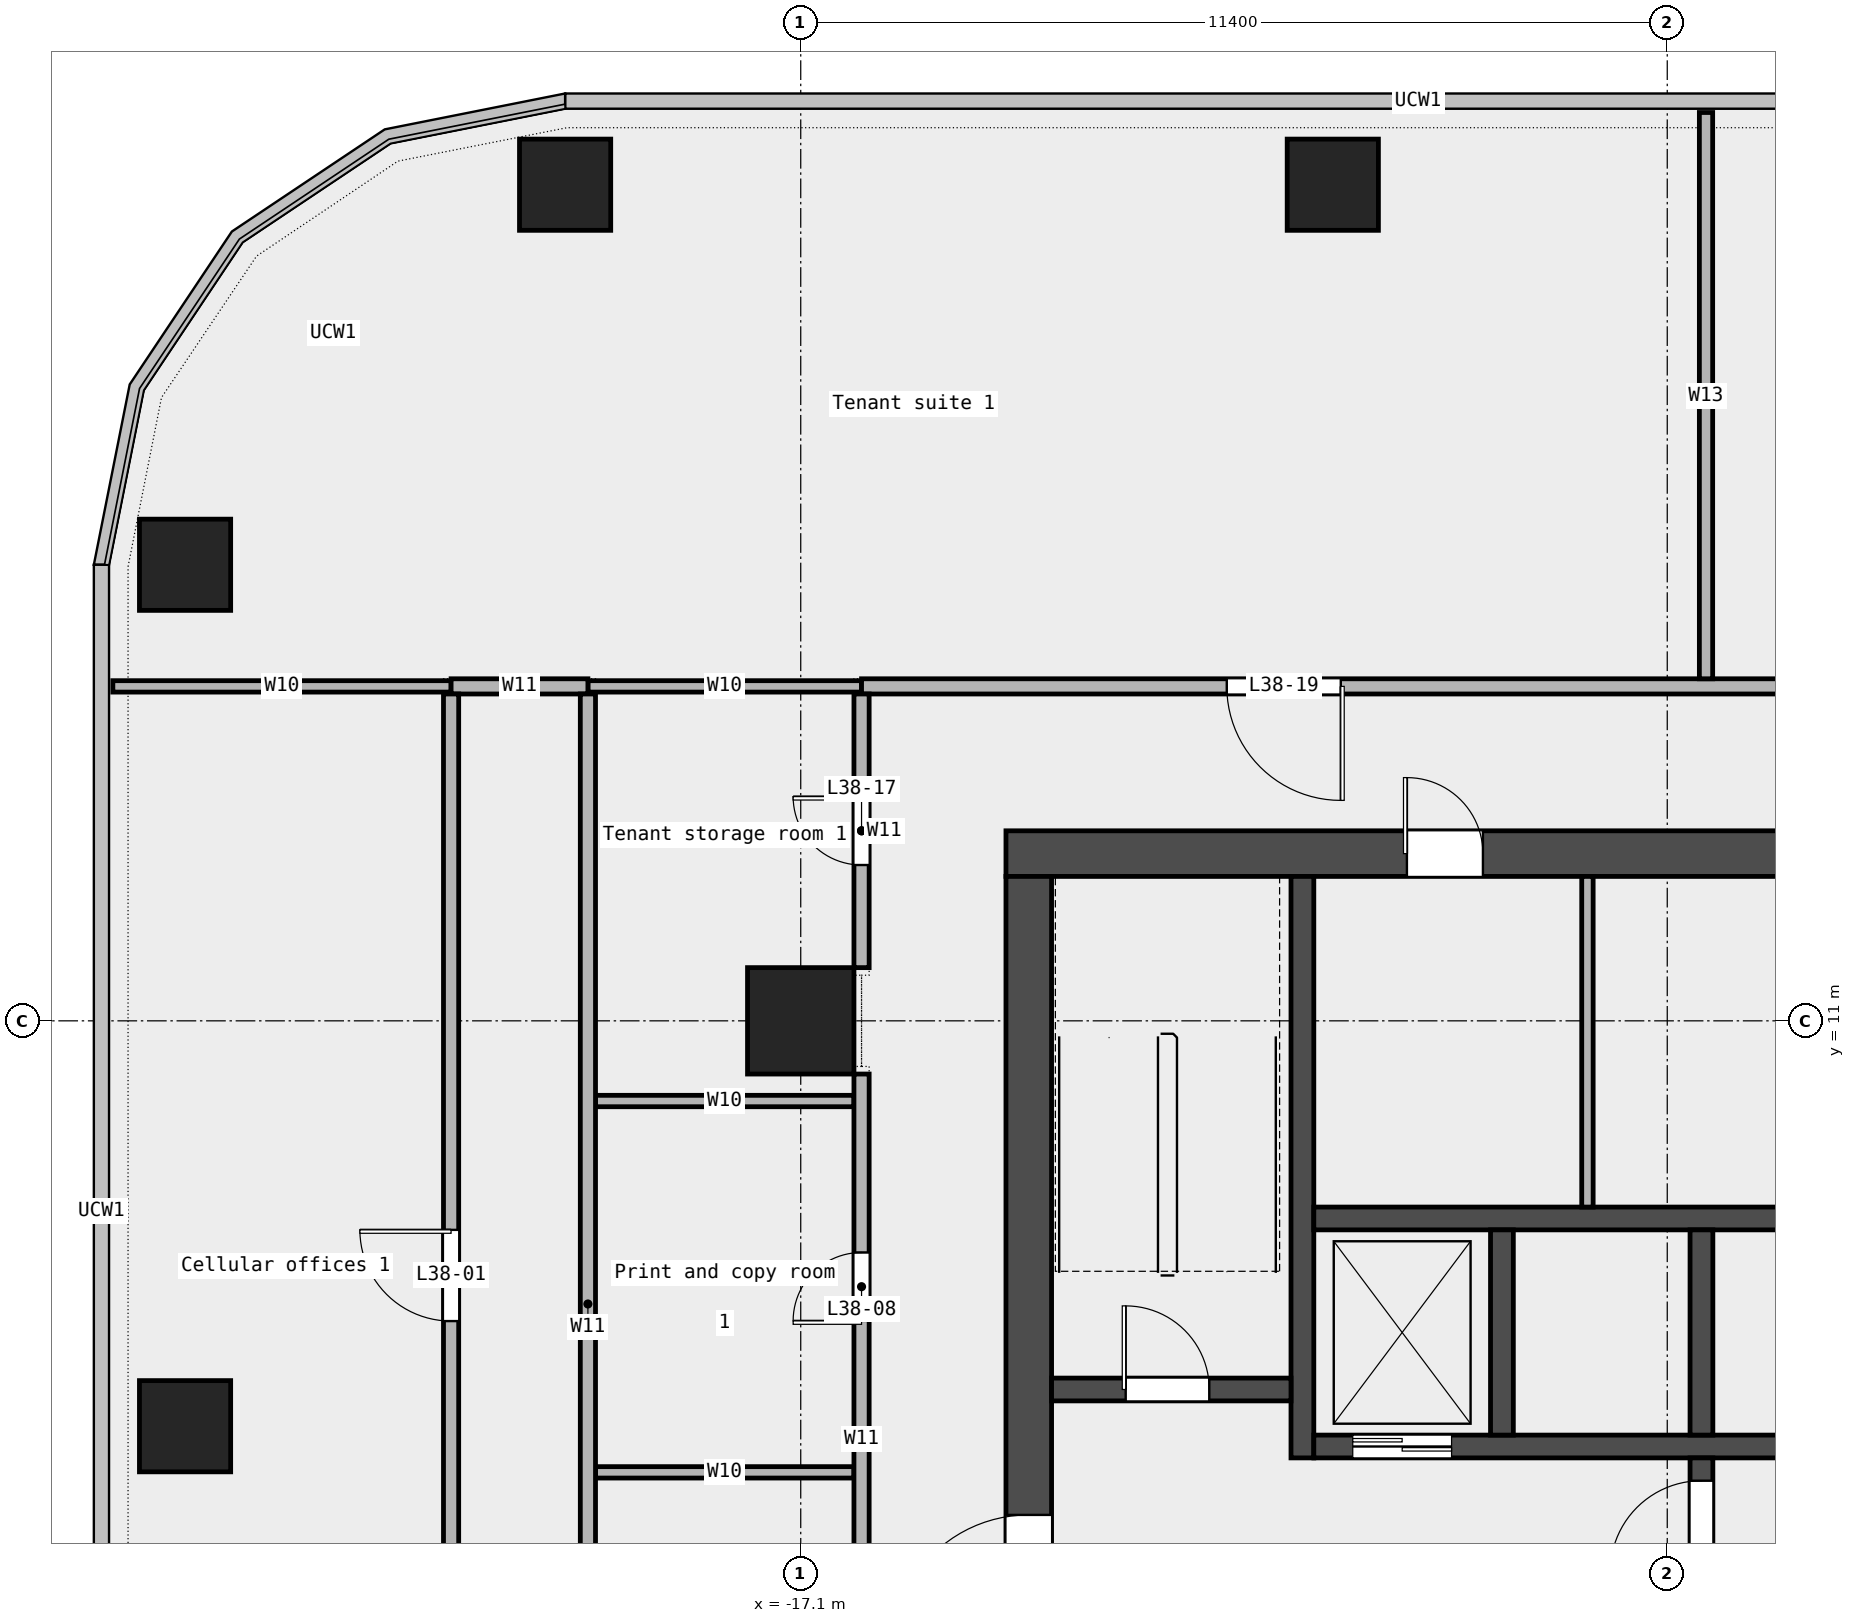
"""IFC4 building model, lengths in metres.
Left out: names, types, materials, properties, quantities, classifications, styles, units other than length and angle.
Written with IfcOpenShell. Run it as: python <this file> out.ifc"""

import sys

from ifc_helpers import new_model, si_unit, direction, frame, frame_2d, origin, origin_2d, place, context, subcontext, project, spatial, rectangle, extrude, element, fill, save


model = new_model("IFC4")
c1 = context("Model", 3, precision=1e-05, world=origin(), true_north=direction((0.0, 1.0)))
c2 = subcontext(c1, "Body", "Model", "MODEL_VIEW")
j1 = project(units=[si_unit("LENGTHUNIT", "METRE"), si_unit("PLANEANGLEUNIT", "RADIAN")], contexts=[c1])
p1 = place(None, origin())
s1 = spatial("IfcSite", under=j1, at=p1, CompositionType="ELEMENT")
p2 = place(p1, origin())
s2 = spatial("IfcBuilding", under=s1, at=p2, CompositionType="ELEMENT")
p3 = place(p2, frame((0.0, 0.0, 185.0)))
s3 = spatial("IfcBuildingStorey", under=s2, at=p3, CompositionType="ELEMENT", Elevation=185.0)
for number, where, z_axis, x_axis in (
    (1, (-10.1, 22.0, 0.0), (0.0, 0.0, 1.0), (1.0, 0.0, 0.0)),
    (2, (-20.2, 22.0, 0.0), (0.0, 0.0, 1.0), (1.0, 0.0, 0.0)),
    (3, (-25.2, 17.0, 0.0), (0.0, 0.0, 1.0), (1.0, 0.0, 0.0)),
    (4, (-25.2, 5.667, 0.0), (0.0, 0.0, 1.0), (1.0, 0.0, 0.0)),
):
    element("IfcColumn", number, at=place(p3, frame(where, z_axis=z_axis, x_axis=x_axis)), inside=s3, PredefinedType="COLUMN", context=c2, shape_type="SweptSolid", body=[
        extrude(rectangle(XDim=1.2, YDim=1.2, at=origin_2d()), origin(), (0.0, 0.0, 1.0), 3.6),
    ])
p4 = place(p3, frame((-17.1, 11.0, 0.0), z_axis=(0.0, 0.0, 1.0), x_axis=(1.0, 0.0, 0.0)))
e5 = element("IfcColumn", 5, at=p4, inside=s3, PredefinedType="COLUMN", context=c2, shape_type="SweptSolid", body=[
    extrude(rectangle(XDim=1.4, YDim=1.4, at=origin_2d()), origin(), (0.0, 0.0, 1.0), 3.6),
])
for number, where, z_axis, x_axis in (
    (6, (-19.8, 5.06, 0.0), (0.0, 0.0, 1.0), (1.0, 0.0, 0.0)),
    (7, (-19.8, 9.945, 0.0), (0.0, 0.0, 1.0), (1.0, 0.0, 0.0)),
):
    element("IfcWall", number, at=place(p3, frame(where, z_axis=z_axis, x_axis=x_axis)), inside=s3, PredefinedType="PARTITIONING", context=c2, shape_type="SweptSolid", body=[
        extrude(rectangle(XDim=3.4, YDim=0.15, at=frame_2d((1.7, 0.0))), origin(), (0.0, 0.0, 1.0), 3.6),
    ])
p5 = place(p3, frame((-26.15, 15.4, 0.0), z_axis=(0.0, 0.0, 1.0), x_axis=(1.0, 0.0, 0.0)))
e8 = element("IfcWall", 8, at=p5, inside=s3, PredefinedType="PARTITIONING", context=c2, shape_type="SweptSolid", body=[
    extrude(rectangle(XDim=4.45, YDim=0.15, at=frame_2d((2.225, 0.0))), origin(), (0.0, 0.0, 1.0), 3.6),
])
p6 = place(p3, frame((-19.9, 15.4, 0.0), z_axis=(0.0, 0.0, 1.0), x_axis=(1.0, 0.0, 0.0)))
e9 = element("IfcWall", 9, at=p6, inside=s3, PredefinedType="PARTITIONING", context=c2, shape_type="SweptSolid", body=[
    extrude(rectangle(XDim=3.6, YDim=0.15, at=frame_2d((1.8, 0.0))), origin(), (0.0, 0.0, 1.0), 3.6),
])
p7 = place(p3, frame((-21.7, 15.4, 0.0), z_axis=(0.0, 0.0, 1.0), x_axis=(1.0, 0.0, 0.0)))
e10 = element("IfcWall", 10, at=p7, inside=s3, PredefinedType="PARTITIONING", context=c2, shape_type="SweptSolid", body=[
    extrude(rectangle(XDim=1.8, YDim=0.2, at=frame_2d((0.9, 0.0))), origin(), (0.0, 0.0, 1.0), 3.6),
])
p8 = place(p3, frame((-16.3, 15.4, 0.0), z_axis=(0.0, 0.0, 1.0), x_axis=(1.0, 0.0, 0.0)))
e11 = element("IfcWall", 11, at=p8, inside=s3, PredefinedType="PARTITIONING", context=c2, shape_type="SweptSolid", body=[
    extrude(rectangle(XDim=32.6, YDim=0.2, at=frame_2d((16.3, 0.0))), origin(), (0.0, 0.0, 1.0), 3.6),
])
p9 = place(p8, frame((24.677, 0.0, 0.0)))
e12 = element("IfcOpeningElement", 12, at=p9, cuts=e11, PredefinedType="OPENING", context=c2, shape_type="SweptSolid", body=[
    extrude(rectangle(XDim=1.2, YDim=2.1, at=frame_2d((0.6, 1.05))), frame((0.0, 0.112, 0.0), z_axis=(0.0, -1.0, 0.0), x_axis=(1.0, 0.0, 0.0)), (0.0, 0.0, 1.0), 0.224),
])
p10 = place(p8, frame((4.805, 0.0, 0.0)))
e13 = element("IfcOpeningElement", 13, at=p10, cuts=e11, PredefinedType="OPENING", context=c2, shape_type="SweptSolid", body=[
    extrude(rectangle(XDim=1.5, YDim=2.1, at=frame_2d((0.75, 1.05))), frame((0.0, 0.112, 0.0), z_axis=(0.0, -1.0, 0.0), x_axis=(1.0, 0.0, 0.0)), (0.0, 0.0, 1.0), 0.224),
])
p11 = place(p8, frame((14.228, 0.0, 0.0)))
e14 = element("IfcOpeningElement", 14, at=p11, cuts=e11, PredefinedType="OPENING", context=c2, shape_type="SweptSolid", body=[
    extrude(rectangle(XDim=1.2, YDim=2.1, at=frame_2d((0.6, 1.05))), frame((0.0, 0.112, 0.0), z_axis=(0.0, -1.0, 0.0), x_axis=(1.0, 0.0, 0.0)), (0.0, 0.0, 1.0), 0.224),
])
p12 = place(p3, frame((-21.7, -9.0, 0.0), z_axis=(0.0, 0.0, 1.0), x_axis=(0.0, 1.0, 0.0)))
e15 = element("IfcWall", 15, at=p12, inside=s3, PredefinedType="PARTITIONING", context=c2, shape_type="SweptSolid", body=[
    extrude(rectangle(XDim=24.3, YDim=0.2, at=frame_2d((12.15, 0.0))), origin(), (0.0, 0.0, 1.0), 3.6),
])
p13 = place(p12, frame((16.05, 0.0, 0.0)))
e16 = element("IfcOpeningElement", 16, at=p13, cuts=e15, PredefinedType="OPENING", context=c2, shape_type="SweptSolid", body=[
    extrude(rectangle(XDim=1.2, YDim=2.1, at=frame_2d((0.6, 1.05))), frame((0.0, 0.112, 0.0), z_axis=(0.0, -1.0, 0.0), x_axis=(1.0, 0.0, 0.0)), (0.0, 0.0, 1.0), 0.224),
])
p14 = place(p3, frame((-19.9, -0.75, 0.0), z_axis=(0.0, 0.0, 1.0), x_axis=(0.0, 1.0, 0.0)))
e17 = element("IfcWall", 17, at=p14, inside=s3, PredefinedType="PARTITIONING", context=c2, shape_type="SweptSolid", body=[
    extrude(rectangle(XDim=16.05, YDim=0.2, at=frame_2d((8.025, 0.0))), origin(), (0.0, 0.0, 1.0), 3.6),
])
p15 = place(p3, frame((-16.3, 0.7, 0.0), z_axis=(0.0, 0.0, 1.0), x_axis=(0.0, 1.0, 0.0)))
e18 = element("IfcWall", 18, at=p15, inside=s3, PredefinedType="PARTITIONING", context=c2, shape_type="SweptSolid", body=[
    extrude(rectangle(XDim=9.6, YDim=0.2, at=frame_2d((4.8, 0.0))), origin(), (0.0, 0.0, 1.0), 3.6),
])
p16 = place(p15, frame((1.73, 0.0, 0.0)))
e19 = element("IfcOpeningElement", 19, at=p16, cuts=e18, PredefinedType="OPENING", context=c2, shape_type="SweptSolid", body=[
    extrude(rectangle(XDim=0.9, YDim=2.1, at=frame_2d((0.45, 1.05))), frame((0.0, 0.112, 0.0), z_axis=(0.0, -1.0, 0.0), x_axis=(1.0, 0.0, 0.0)), (0.0, 0.0, 1.0), 0.224),
])
p17 = place(p15, frame((6.353, 0.0, 0.0)))
e20 = element("IfcOpeningElement", 20, at=p17, cuts=e18, PredefinedType="OPENING", context=c2, shape_type="SweptSolid", body=[
    extrude(rectangle(XDim=0.9, YDim=2.1, at=frame_2d((0.45, 1.05))), frame((0.0, 0.112, 0.0), z_axis=(0.0, -1.0, 0.0), x_axis=(1.0, 0.0, 0.0)), (0.0, 0.0, 1.0), 0.224),
])
p18 = place(p3, frame((-16.3, 11.7, 0.0), z_axis=(0.0, 0.0, 1.0), x_axis=(0.0, 1.0, 0.0)))
e21 = element("IfcWall", 21, at=p18, inside=s3, PredefinedType="PARTITIONING", context=c2, shape_type="SweptSolid", body=[
    extrude(rectangle(XDim=3.6, YDim=0.2, at=frame_2d((1.8, 0.0))), origin(), (0.0, 0.0, 1.0), 3.6),
])
p19 = place(p18, frame((1.35, 0.0, 0.0)))
e22 = element("IfcOpeningElement", 22, at=p19, cuts=e21, PredefinedType="OPENING", context=c2, shape_type="SweptSolid", body=[
    extrude(rectangle(XDim=0.9, YDim=2.1, at=frame_2d((0.45, 1.05))), frame((0.0, 0.112, 0.0), z_axis=(0.0, -1.0, 0.0), x_axis=(1.0, 0.0, 0.0)), (0.0, 0.0, 1.0), 0.224),
])
p20 = place(p3, frame((-5.19, 15.5, 0.0), z_axis=(0.0, 0.0, 1.0), x_axis=(0.0, 1.0, 0.0)))
e23 = element("IfcWall", 23, at=p20, inside=s3, PredefinedType="PARTITIONING", context=c2, shape_type="SweptSolid", body=[
    extrude(rectangle(XDim=7.45, YDim=0.175, at=frame_2d((3.725, 0.0))), origin(), (0.0, 0.0, 1.0), 3.6),
])
p21 = place(p3, frame((-14.4, 13.2, 0.0), z_axis=(0.0, 0.0, 1.0), x_axis=(1.0, 0.0, 0.0)))
e24 = element("IfcWall", 24, at=p21, inside=s3, PredefinedType="SHEAR", context=c2, shape_type="SweptSolid", body=[
    extrude(rectangle(XDim=28.8, YDim=0.6, at=frame_2d((14.4, 0.0))), origin(), (0.0, 0.0, 1.0), 3.7),
])
p22 = place(p21, frame((5.275, 0.0, 0.0)))
e25 = element("IfcOpeningElement", 25, at=p22, cuts=e24, PredefinedType="OPENING", context=c2, shape_type="SweptSolid", body=[
    extrude(rectangle(XDim=1.0, YDim=2.1, at=frame_2d((0.5, 1.05))), frame((0.0, 0.312, 0.0), z_axis=(0.0, -1.0, 0.0), x_axis=(1.0, 0.0, 0.0)), (0.0, 0.0, 1.0), 0.624),
])
p23 = place(p21, frame((10.525, 0.0, 0.0)))
e26 = element("IfcOpeningElement", 26, at=p23, cuts=e24, PredefinedType="OPENING", context=c2, shape_type="SweptSolid", body=[
    extrude(rectangle(XDim=1.0, YDim=2.1, at=frame_2d((0.5, 1.05))), frame((0.0, 0.312, 0.0), z_axis=(0.0, -1.0, 0.0), x_axis=(1.0, 0.0, 0.0)), (0.0, 0.0, 1.0), 0.624),
])
p24 = place(p21, frame((15.587, 0.0, 0.0)))
e27 = element("IfcOpeningElement", 27, at=p24, cuts=e24, PredefinedType="OPENING", context=c2, shape_type="SweptSolid", body=[
    extrude(rectangle(XDim=1.0, YDim=2.1, at=frame_2d((0.5, 1.05))), frame((0.0, 0.312, 0.0), z_axis=(0.0, -1.0, 0.0), x_axis=(1.0, 0.0, 0.0)), (0.0, 0.0, 1.0), 0.624),
])
p25 = place(p21, frame((19.15, 0.0, 0.0)))
e28 = element("IfcOpeningElement", 28, at=p25, cuts=e24, PredefinedType="OPENING", context=c2, shape_type="SweptSolid", body=[
    extrude(rectangle(XDim=1.0, YDim=2.1, at=frame_2d((0.5, 1.05))), frame((0.0, 0.312, 0.0), z_axis=(0.0, -1.0, 0.0), x_axis=(1.0, 0.0, 0.0)), (0.0, 0.0, 1.0), 0.624),
])
p26 = place(p21, frame((22.712, 0.0, 0.0)))
e29 = element("IfcOpeningElement", 29, at=p26, cuts=e24, PredefinedType="OPENING", context=c2, shape_type="SweptSolid", body=[
    extrude(rectangle(XDim=1.0, YDim=2.1, at=frame_2d((0.5, 1.05))), frame((0.0, 0.312, 0.0), z_axis=(0.0, -1.0, 0.0), x_axis=(1.0, 0.0, 0.0)), (0.0, 0.0, 1.0), 0.624),
])
p27 = place(p3, frame((-14.1, -6.6, 0.0), z_axis=(0.0, 0.0, 1.0), x_axis=(0.0, 1.0, 0.0)))
e30 = element("IfcWall", 30, at=p27, inside=s3, PredefinedType="SHEAR", context=c2, shape_type="SweptSolid", body=[
    extrude(rectangle(XDim=19.5, YDim=0.6, at=frame_2d((9.75, 0.0))), origin(), (0.0, 0.0, 1.0), 3.7),
])
p28 = place(p27, frame((9.3, 0.0, 0.0)))
e31 = element("IfcOpeningElement", 31, at=p28, cuts=e30, PredefinedType="OPENING", context=c2, shape_type="SweptSolid", body=[
    extrude(rectangle(XDim=1.8, YDim=2.1, at=frame_2d((0.9, 1.05))), frame((0.0, 0.312, 0.0), z_axis=(0.0, -1.0, 0.0), x_axis=(1.0, 0.0, 0.0)), (0.0, 0.0, 1.0), 0.624),
])
p29 = place(p3, frame((-10.5, 5.25, 0.0), z_axis=(0.0, 0.0, 1.0), x_axis=(0.0, 1.0, 0.0)))
e32 = element("IfcWall", 32, at=p29, inside=s3, PredefinedType="SHEAR", context=c2, shape_type="SweptSolid", body=[
    extrude(rectangle(XDim=7.65, YDim=0.3, at=frame_2d((3.825, 0.0))), origin(), (0.0, 0.0, 1.0), 3.7),
])
p30 = place(p3, frame((-13.8, 6.15, 0.0), z_axis=(0.0, 0.0, 1.0), x_axis=(1.0, 0.0, 0.0)))
e33 = element("IfcWall", 33, at=p30, inside=s3, PredefinedType="SOLIDWALL", context=c2, shape_type="SweptSolid", body=[
    extrude(rectangle(XDim=3.15, YDim=0.3, at=frame_2d((1.575, 0.0))), origin(), (0.0, 0.0, 1.0), 3.7),
])
p31 = place(p30, frame((0.975, 0.0, 0.0)))
e34 = element("IfcOpeningElement", 34, at=p31, cuts=e33, PredefinedType="OPENING", context=c2, shape_type="SweptSolid", body=[
    extrude(rectangle(XDim=1.1, YDim=2.1, at=frame_2d((0.55, 1.05))), frame((0.0, 0.162, 0.0), z_axis=(0.0, -1.0, 0.0), x_axis=(1.0, 0.0, 0.0)), (0.0, 0.0, 1.0), 0.324),
])
p32 = place(p3, frame((-10.35, 5.4, 0.0), z_axis=(0.0, 0.0, 1.0), x_axis=(1.0, 0.0, 0.0)))
e35 = element("IfcWall", 35, at=p32, inside=s3, PredefinedType="SOLIDWALL", context=c2, shape_type="SweptSolid", body=[
    extrude(rectangle(XDim=20.7, YDim=0.3, at=frame_2d((10.35, 0.0))), origin(), (0.0, 0.0, 1.0), 3.7),
])
p33 = place(p32, frame((0.512, 0.0, 0.0)))
e36 = element("IfcOpeningElement", 36, at=p33, cuts=e35, PredefinedType="OPENING", context=c2, shape_type="SweptSolid", body=[
    extrude(rectangle(XDim=1.3, YDim=2.1, at=frame_2d((0.65, 1.05))), frame((0.0, 0.162, 0.0), z_axis=(0.0, -1.0, 0.0), x_axis=(1.0, 0.0, 0.0)), (0.0, 0.0, 1.0), 0.324),
])
p34 = place(p3, frame((-10.35, 8.4, 0.0), z_axis=(0.0, 0.0, 1.0), x_axis=(1.0, 0.0, 0.0)))
e37 = element("IfcWall", 37, at=p34, inside=s3, PredefinedType="SOLIDWALL", context=c2, shape_type="SweptSolid", body=[
    extrude(rectangle(XDim=20.7, YDim=0.3, at=frame_2d((10.35, 0.0))), origin(), (0.0, 0.0, 1.0), 3.7),
])
for number, where, z_axis, x_axis in (
    (38, (-7.875, 5.55, 0.0), (0.0, 0.0, 1.0), (0.0, 1.0, 0.0)),
    (39, (-5.25, 5.55, 0.0), (0.0, 0.0, 1.0), (0.0, 1.0, 0.0)),
):
    element("IfcWall", number, at=place(p3, frame(where, z_axis=z_axis, x_axis=x_axis)), inside=s3, PredefinedType="SOLIDWALL", context=c2, shape_type="SweptSolid", body=[
        extrude(rectangle(XDim=2.7, YDim=0.3, at=frame_2d((1.35, 0.0))), origin(), (0.0, 0.0, 1.0), 3.7),
    ])
p35 = place(p3, frame((-5.25, 1.95, 0.0), z_axis=(0.0, 0.0, 1.0), x_axis=(0.0, 1.0, 0.0)))
e40 = element("IfcWall", 40, at=p35, inside=s3, PredefinedType="SOLIDWALL", context=c2, shape_type="SweptSolid", body=[
    extrude(rectangle(XDim=3.3, YDim=0.3, at=frame_2d((1.65, 0.0))), origin(), (0.0, 0.0, 1.0), 3.7),
])
p36 = place(p35, frame((0.3, 0.0, 0.0)))
e41 = element("IfcOpeningElement", 41, at=p36, cuts=e40, PredefinedType="OPENING", context=c2, shape_type="SweptSolid", body=[
    extrude(rectangle(XDim=1.2, YDim=2.1, at=frame_2d((0.6, 1.05))), frame((0.0, 0.162, 0.0), z_axis=(0.0, -1.0, 0.0), x_axis=(1.0, 0.0, 0.0)), (0.0, 0.0, 1.0), 0.324),
])
p37 = place(p35, frame((1.8, 0.0, 0.0)))
e42 = element("IfcOpeningElement", 42, at=p37, cuts=e40, PredefinedType="OPENING", context=c2, shape_type="SweptSolid", body=[
    extrude(rectangle(XDim=1.2, YDim=2.1, at=frame_2d((0.6, 1.05))), frame((0.0, 0.162, 0.0), z_axis=(0.0, -1.0, 0.0), x_axis=(1.0, 0.0, 0.0)), (0.0, 0.0, 1.0), 0.324),
])
p38 = place(p3, frame((-6.75, 8.55, 0.0), z_axis=(0.0, 0.0, 1.0), x_axis=(0.0, 1.0, 0.0)))
e43 = element("IfcWall", 43, at=p38, inside=s3, PredefinedType="PARTITIONING", context=c2, shape_type="SweptSolid", body=[
    extrude(rectangle(XDim=4.35, YDim=0.15, at=frame_2d((2.175, 0.0))), origin(), (0.0, 0.0, 1.0), 3.7),
])
p39 = place(p13, origin())
e44 = element("IfcDoor", 44, at=p39, inside=s3, OperationType="SINGLE_SWING_RIGHT", PredefinedType="DOOR", context=c2, shape_type="SweptSolid", body=[
    extrude(rectangle(XDim=1.2, YDim=2.1, at=frame_2d((0.6, 1.05))), frame((0.0, 0.025, 0.0), z_axis=(0.0, -1.0, 0.0), x_axis=(1.0, 0.0, 0.0)), (0.0, 0.0, 1.0), 0.05),
])
fill(e16, e44)
p40 = place(p17, origin())
e45 = element("IfcDoor", 45, at=p40, inside=s3, OperationType="SINGLE_SWING_LEFT", PredefinedType="DOOR", context=c2, shape_type="SweptSolid", body=[
    extrude(rectangle(XDim=0.9, YDim=2.1, at=frame_2d((0.45, 1.05))), frame((0.0, 0.025, 0.0), z_axis=(0.0, -1.0, 0.0), x_axis=(1.0, 0.0, 0.0)), (0.0, 0.0, 1.0), 0.05),
])
fill(e20, e45)
p41 = place(p19, origin())
e46 = element("IfcDoor", 46, at=p41, inside=s3, OperationType="SINGLE_SWING_RIGHT", PredefinedType="DOOR", context=c2, shape_type="SweptSolid", body=[
    extrude(rectangle(XDim=0.9, YDim=2.1, at=frame_2d((0.45, 1.05))), frame((0.0, 0.025, 0.0), z_axis=(0.0, -1.0, 0.0), x_axis=(1.0, 0.0, 0.0)), (0.0, 0.0, 1.0), 0.05),
])
fill(e22, e46)
p42 = place(p10, origin())
e47 = element("IfcDoor", 47, at=p42, inside=s3, OperationType="DOUBLE_DOOR_SINGLE_SWING", PredefinedType="DOOR", context=c2, shape_type="SweptSolid", body=[
    extrude(rectangle(XDim=1.5, YDim=2.1, at=frame_2d((0.75, 1.05))), frame((0.0, 0.025, 0.0), z_axis=(0.0, -1.0, 0.0), x_axis=(1.0, 0.0, 0.0)), (0.0, 0.0, 1.0), 0.05),
])
fill(e13, e47)
p43 = place(p31, origin())
e48 = element("IfcDoor", 48, at=p43, inside=s3, OperationType="SINGLE_SWING_LEFT", PredefinedType="DOOR", context=c2, shape_type="SweptSolid", body=[
    extrude(rectangle(XDim=1.1, YDim=2.1, at=frame_2d((0.55, 1.05))), frame((0.0, 0.025, 0.0), z_axis=(0.0, -1.0, 0.0), x_axis=(1.0, 0.0, 0.0)), (0.0, 0.0, 1.0), 0.05),
])
fill(e34, e48)
p44 = place(p28, origin())
e49 = element("IfcDoor", 49, at=p44, inside=s3, OperationType="DOUBLE_DOOR_SINGLE_SWING", PredefinedType="DOOR", context=c2, shape_type="SweptSolid", body=[
    extrude(rectangle(XDim=1.8, YDim=2.1, at=frame_2d((0.9, 1.05))), frame((0.0, 0.025, 0.0), z_axis=(0.0, -1.0, 0.0), x_axis=(1.0, 0.0, 0.0)), (0.0, 0.0, 1.0), 0.05),
])
fill(e31, e49)
p45 = place(p37, origin())
e50 = element("IfcDoor", 50, at=p45, inside=s3, OperationType="SINGLE_SWING_RIGHT", PredefinedType="DOOR", context=c2, shape_type="SweptSolid", body=[
    extrude(rectangle(XDim=1.2, YDim=2.1, at=frame_2d((0.6, 1.05))), frame((0.0, 0.025, 0.0), z_axis=(0.0, -1.0, 0.0), x_axis=(1.0, 0.0, 0.0)), (0.0, 0.0, 1.0), 0.05),
])
fill(e42, e50)
p46 = place(p33, origin())
e51 = element("IfcDoor", 51, at=p46, inside=s3, OperationType="DOUBLE_DOOR_SLIDING", PredefinedType="DOOR", context=c2, shape_type="SweptSolid", body=[
    extrude(rectangle(XDim=1.3, YDim=2.1, at=frame_2d((0.65, 1.05))), frame((0.0, 0.025, 0.0), z_axis=(0.0, -1.0, 0.0), x_axis=(1.0, 0.0, 0.0)), (0.0, 0.0, 1.0), 0.05),
])
fill(e36, e51)
p47 = place(p22, origin())
e52 = element("IfcDoor", 52, at=p47, inside=s3, OperationType="SINGLE_SWING_LEFT", PredefinedType="DOOR", context=c2, shape_type="SweptSolid", body=[
    extrude(rectangle(XDim=1.0, YDim=2.1, at=frame_2d((0.5, 1.05))), frame((0.0, 0.025, 0.0), z_axis=(0.0, -1.0, 0.0), x_axis=(1.0, 0.0, 0.0)), (0.0, 0.0, 1.0), 0.05),
])
fill(e25, e52)
save(model, sys.argv[1])
